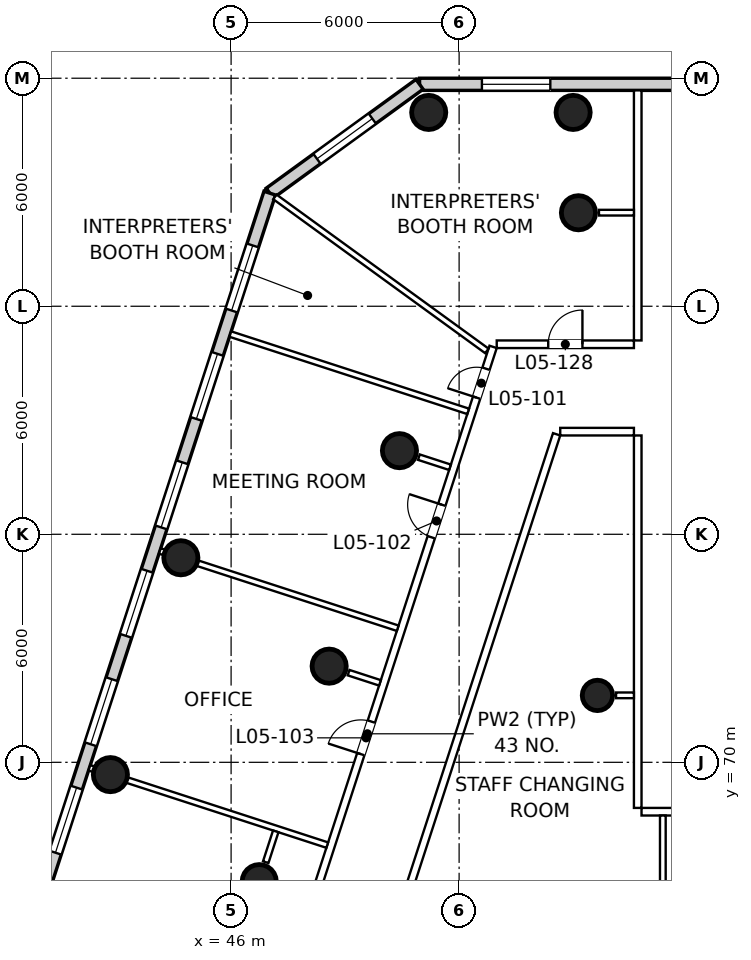
"""IFC4 building model, lengths in metres.
Left out: names, types, materials, properties, quantities, classifications, styles, units other than length and angle.
Written with IfcOpenShell. Run it as: python <this file> out.ifc"""

import sys

from ifc_helpers import new_model, si_unit, direction, frame, frame_2d, origin, origin_2d, place, context, subcontext, project, spatial, rectangle, circle, extrude, element, fill, save


model = new_model("IFC4")
c1 = context("Model", 3, precision=1e-05, world=origin(), true_north=direction((0.0, 1.0)))
c2 = subcontext(c1, "Body", "Model", "MODEL_VIEW")
j1 = project(units=[si_unit("LENGTHUNIT", "METRE"), si_unit("PLANEANGLEUNIT", "RADIAN")], contexts=[c1])
p1 = place(None, origin())
s1 = spatial("IfcSite", under=j1, at=p1, CompositionType="ELEMENT")
p2 = place(p1, origin())
s2 = spatial("IfcBuilding", under=s1, at=p2, CompositionType="ELEMENT")
p3 = place(p2, frame((0.0, 0.0, 34.0)))
s3 = spatial("IfcBuildingStorey", under=s2, at=p3, CompositionType="ELEMENT", Elevation=34.0)
for number, where, z_axis, x_axis in (
    (1, (55.14, 84.46, 0.0), (0.0, 0.0, 1.0), (1.0, 0.0, 0.0)),
    (2, (50.43, 78.2, 0.0), (0.0, 0.0, 1.0), (1.0, 0.0, 0.0)),
    (3, (48.58, 72.53, 0.0), (0.0, 0.0, 1.0), (1.0, 0.0, 0.0)),
    (4, (46.74, 66.86, 0.0), (0.0, 0.0, 1.0), (1.0, 0.0, 0.0)),
):
    element("IfcColumn", number, at=place(p3, frame(where, z_axis=z_axis, x_axis=x_axis)), inside=s3, PredefinedType="COLUMN", context=c2, shape_type="SweptSolid", body=[
        extrude(circle(Radius=0.45, at=origin_2d()), origin(), (0.0, 0.0, 1.0), 5.0),
    ])
p4 = place(p3, frame((55.64, 71.76, 0.0), z_axis=(0.0, 0.0, 1.0), x_axis=(1.0, 0.0, 0.0)))
e5 = element("IfcColumn", 5, at=p4, inside=s3, PredefinedType="COLUMN", context=c2, shape_type="SweptSolid", body=[
    extrude(circle(Radius=0.4, at=origin_2d()), origin(), (0.0, 0.0, 1.0), 5.0),
])
for number, where, z_axis, x_axis in (
    (6, (55.0, 87.1, 0.0), (0.0, 0.0, 1.0), (1.0, 0.0, 0.0)),
    (7, (51.2, 87.1, 0.0), (0.0, 0.0, 1.0), (1.0, 0.0, 0.0)),
    (8, (44.678, 75.382, 0.0), (0.0, 0.0, 1.0), (1.0, 0.0, 0.0)),
    (9, (42.824, 69.676, 0.0), (0.0, 0.0, 1.0), (1.0, 0.0, 0.0)),
):
    element("IfcColumn", number, at=place(p3, frame(where, z_axis=z_axis, x_axis=x_axis)), inside=s3, PredefinedType="COLUMN", context=c2, shape_type="SweptSolid", body=[
        extrude(circle(Radius=0.45, at=origin_2d()), origin(), (0.0, 0.0, 1.0), 5.0),
    ])
p5 = place(p3, frame((59.0, 87.84, 0.0), z_axis=(0.0, 0.0, 1.0), x_axis=(-1.0, 0.0, 0.0)))
e10 = element("IfcWall", 10, at=p5, inside=s3, PredefinedType="SOLIDWALL", context=c2, shape_type="SweptSolid", body=[
    extrude(rectangle(XDim=8.041, YDim=0.32, at=frame_2d((4.021, 0.0))), origin(), (0.0, 0.0, 1.0), 4.6),
])
p6 = place(p5, frame((4.6, 0.0, 0.9)))
e11 = element("IfcOpeningElement", 11, at=p6, cuts=e10, PredefinedType="OPENING", context=c2, shape_type="SweptSolid", body=[
    extrude(rectangle(XDim=1.8, YDim=2.1, at=frame_2d((0.9, 1.05))), frame((0.0, 0.17, 0.0), z_axis=(0.0, -1.0, 0.0), x_axis=(1.0, 0.0, 0.0)), (0.0, 0.0, 1.0), 0.34),
])
p7 = place(p3, frame((50.959, 87.84, 0.0), z_axis=(0.0, 0.0, 1.0), x_axis=(-0.809004657531, -0.587802232127, 0.0)))
e12 = element("IfcWall", 12, at=p7, inside=s3, PredefinedType="SOLIDWALL", context=c2, shape_type="SweptSolid", body=[
    extrude(rectangle(XDim=4.873, YDim=0.32, at=frame_2d((2.437, 0.0))), origin(), (0.0, 0.0, 1.0), 4.6),
])
p8 = place(p7, frame((1.536, 0.0, 0.9)))
e13 = element("IfcOpeningElement", 13, at=p8, cuts=e12, PredefinedType="OPENING", context=c2, shape_type="SweptSolid", body=[
    extrude(rectangle(XDim=1.8, YDim=2.1, at=frame_2d((0.9, 1.05))), frame((0.0, 0.17, 0.0), z_axis=(0.0, -1.0, 0.0), x_axis=(1.0, 0.0, 0.0)), (0.0, 0.0, 1.0), 0.34),
])
p9 = place(p3, frame((47.017, 84.976, 0.0), z_axis=(0.0, 0.0, 1.0), x_axis=(-0.309015385889, -0.951057038922, 0.0)))
e14 = element("IfcWall", 14, at=p9, inside=s3, PredefinedType="SOLIDWALL", context=c2, shape_type="SweptSolid", body=[
    extrude(rectangle(XDim=25.694, YDim=0.32, at=frame_2d((12.847, 0.0))), origin(), (0.0, 0.0, 1.0), 4.6),
])
p10 = place(p9, frame((1.447, 0.0, 0.9)))
e15 = element("IfcOpeningElement", 15, at=p10, cuts=e14, PredefinedType="OPENING", context=c2, shape_type="SweptSolid", body=[
    extrude(rectangle(XDim=1.8, YDim=2.1, at=frame_2d((0.9, 1.05))), frame((0.0, 0.17, 0.0), z_axis=(0.0, -1.0, 0.0), x_axis=(1.0, 0.0, 0.0)), (0.0, 0.0, 1.0), 0.34),
])
p11 = place(p9, frame((4.447, 0.0, 0.9)))
e16 = element("IfcOpeningElement", 16, at=p11, cuts=e14, PredefinedType="OPENING", context=c2, shape_type="SweptSolid", body=[
    extrude(rectangle(XDim=1.8, YDim=2.1, at=frame_2d((0.9, 1.05))), frame((0.0, 0.17, 0.0), z_axis=(0.0, -1.0, 0.0), x_axis=(1.0, 0.0, 0.0)), (0.0, 0.0, 1.0), 0.34),
])
p12 = place(p9, frame((7.447, 0.0, 0.9)))
e17 = element("IfcOpeningElement", 17, at=p12, cuts=e14, PredefinedType="OPENING", context=c2, shape_type="SweptSolid", body=[
    extrude(rectangle(XDim=1.8, YDim=2.1, at=frame_2d((0.9, 1.05))), frame((0.0, 0.17, 0.0), z_axis=(0.0, -1.0, 0.0), x_axis=(1.0, 0.0, 0.0)), (0.0, 0.0, 1.0), 0.34),
])
p13 = place(p9, frame((10.447, 0.0, 0.9)))
e18 = element("IfcOpeningElement", 18, at=p13, cuts=e14, PredefinedType="OPENING", context=c2, shape_type="SweptSolid", body=[
    extrude(rectangle(XDim=1.8, YDim=2.1, at=frame_2d((0.9, 1.05))), frame((0.0, 0.17, 0.0), z_axis=(0.0, -1.0, 0.0), x_axis=(1.0, 0.0, 0.0)), (0.0, 0.0, 1.0), 0.34),
])
p14 = place(p9, frame((13.447, 0.0, 0.9)))
e19 = element("IfcOpeningElement", 19, at=p14, cuts=e14, PredefinedType="OPENING", context=c2, shape_type="SweptSolid", body=[
    extrude(rectangle(XDim=1.8, YDim=2.1, at=frame_2d((0.9, 1.05))), frame((0.0, 0.17, 0.0), z_axis=(0.0, -1.0, 0.0), x_axis=(1.0, 0.0, 0.0)), (0.0, 0.0, 1.0), 0.34),
])
p15 = place(p9, frame((16.447, 0.0, 0.9)))
e20 = element("IfcOpeningElement", 20, at=p15, cuts=e14, PredefinedType="OPENING", context=c2, shape_type="SweptSolid", body=[
    extrude(rectangle(XDim=1.8, YDim=2.1, at=frame_2d((0.9, 1.05))), frame((0.0, 0.17, 0.0), z_axis=(0.0, -1.0, 0.0), x_axis=(1.0, 0.0, 0.0)), (0.0, 0.0, 1.0), 0.34),
])
p16 = place(p9, frame((19.447, 0.0, 0.9)))
e21 = element("IfcOpeningElement", 21, at=p16, cuts=e14, PredefinedType="OPENING", context=c2, shape_type="SweptSolid", body=[
    extrude(rectangle(XDim=1.8, YDim=2.1, at=frame_2d((0.9, 1.05))), frame((0.0, 0.17, 0.0), z_axis=(0.0, -1.0, 0.0), x_axis=(1.0, 0.0, 0.0)), (0.0, 0.0, 1.0), 0.34),
])
p17 = place(p9, frame((22.447, 0.0, 0.9)))
e22 = element("IfcOpeningElement", 22, at=p17, cuts=e14, PredefinedType="OPENING", context=c2, shape_type="SweptSolid", body=[
    extrude(rectangle(XDim=1.8, YDim=2.1, at=frame_2d((0.9, 1.05))), frame((0.0, 0.17, 0.0), z_axis=(0.0, -1.0, 0.0), x_axis=(1.0, 0.0, 0.0)), (0.0, 0.0, 1.0), 0.34),
])
p18 = place(p3, frame((46.279, 60.57, 0.0), z_axis=(0.0, 0.0, 1.0), x_axis=(0.309020575415, 0.951055352737, 0.0)))
e23 = element("IfcWall", 23, at=p18, inside=s3, PredefinedType="PARTITIONING", context=c2, shape_type="SweptSolid", body=[
    extrude(rectangle(XDim=21.409, YDim=0.2, at=frame_2d((10.704, 0.0))), origin(), (0.0, 0.0, 1.0), 3.9),
])
p19 = place(p18, frame((20.005, 0.0, 0.0)))
e24 = element("IfcOpeningElement", 24, at=p19, cuts=e23, PredefinedType="OPENING", context=c2, shape_type="SweptSolid", body=[
    extrude(rectangle(XDim=0.8, YDim=2.1, at=frame_2d((0.4, 1.05))), frame((0.0, 0.11, 0.0), z_axis=(0.0, -1.0, 0.0), x_axis=(1.0, 0.0, 0.0)), (0.0, 0.0, 1.0), 0.22),
])
p20 = place(p18, frame((16.142, 0.0, 0.0)))
e25 = element("IfcOpeningElement", 25, at=p20, cuts=e23, PredefinedType="OPENING", context=c2, shape_type="SweptSolid", body=[
    extrude(rectangle(XDim=0.9, YDim=2.1, at=frame_2d((0.45, 1.05))), frame((0.0, 0.11, 0.0), z_axis=(0.0, -1.0, 0.0), x_axis=(1.0, 0.0, 0.0)), (0.0, 0.0, 1.0), 0.22),
])
p21 = place(p18, frame((10.142, 0.0, 0.0)))
e26 = element("IfcOpeningElement", 26, at=p21, cuts=e23, PredefinedType="OPENING", context=c2, shape_type="SweptSolid", body=[
    extrude(rectangle(XDim=0.9, YDim=2.1, at=frame_2d((0.45, 1.05))), frame((0.0, 0.11, 0.0), z_axis=(0.0, -1.0, 0.0), x_axis=(1.0, 0.0, 0.0)), (0.0, 0.0, 1.0), 0.22),
])
p22 = place(p18, frame((3.33, 0.0, 0.0)))
e27 = element("IfcOpeningElement", 27, at=p22, cuts=e23, PredefinedType="OPENING", context=c2, shape_type="SweptSolid", body=[
    extrude(rectangle(XDim=0.9, YDim=2.1, at=frame_2d((0.45, 1.05))), frame((0.0, 0.11, 0.0), z_axis=(0.0, -1.0, 0.0), x_axis=(1.0, 0.0, 0.0)), (0.0, 0.0, 1.0), 0.22),
])
p23 = place(p3, frame((52.99, 81.0, 0.0), z_axis=(0.0, 0.0, 1.0), x_axis=(1.0, 0.0, 0.0)))
e28 = element("IfcWall", 28, at=p23, inside=s3, PredefinedType="PARTITIONING", context=c2, shape_type="SweptSolid", body=[
    extrude(rectangle(XDim=3.61, YDim=0.2, at=frame_2d((1.805, 0.0))), origin(), (0.0, 0.0, 1.0), 4.6),
])
p24 = place(p23, frame((1.355, 0.0, 0.0)))
e29 = element("IfcOpeningElement", 29, at=p24, cuts=e28, PredefinedType="OPENING", context=c2, shape_type="SweptSolid", body=[
    extrude(rectangle(XDim=0.9, YDim=2.1, at=frame_2d((0.45, 1.05))), frame((0.0, 0.11, 0.0), z_axis=(0.0, -1.0, 0.0), x_axis=(1.0, 0.0, 0.0)), (0.0, 0.0, 1.0), 0.22),
])
p25 = place(p3, frame((56.7, 81.1, 0.0), z_axis=(0.0, 0.0, 1.0), x_axis=(0.0, 1.0, 0.0)))
e30 = element("IfcWall", 30, at=p25, inside=s3, PredefinedType="PARTITIONING", context=c2, shape_type="SweptSolid", body=[
    extrude(rectangle(XDim=6.58, YDim=0.2, at=frame_2d((3.29, 0.0))), origin(), (0.0, 0.0, 1.0), 3.9),
])
p26 = place(p3, frame((68.75, 68.7, 0.0), z_axis=(0.0, 0.0, 1.0), x_axis=(-1.0, 0.0, 0.0)))
e31 = element("IfcWall", 31, at=p26, inside=s3, PredefinedType="PARTITIONING", context=c2, shape_type="SweptSolid", body=[
    extrude(rectangle(XDim=11.95, YDim=0.2, at=frame_2d((5.975, 0.0))), origin(), (0.0, 0.0, 1.0), 4.6),
])
p27 = place(p26, frame((5.195, 0.0, 0.0)))
e32 = element("IfcOpeningElement", 32, at=p27, cuts=e31, PredefinedType="OPENING", context=c2, shape_type="SweptSolid", body=[
    extrude(rectangle(XDim=0.9, YDim=2.1, at=frame_2d((0.45, 1.05))), frame((0.0, 0.11, 0.0), z_axis=(0.0, -1.0, 0.0), x_axis=(1.0, 0.0, 0.0)), (0.0, 0.0, 1.0), 0.22),
])
p28 = place(p3, frame((56.7, 68.8, 0.0), z_axis=(0.0, 0.0, 1.0), x_axis=(0.0, 1.0, 0.0)))
e33 = element("IfcWall", 33, at=p28, inside=s3, PredefinedType="PARTITIONING", context=c2, shape_type="SweptSolid", body=[
    extrude(rectangle(XDim=9.8, YDim=0.2, at=frame_2d((4.9, 0.0))), origin(), (0.0, 0.0, 1.0), 4.0),
])
p29 = place(p3, frame((56.6, 78.7, 0.0), z_axis=(0.0, 0.0, 1.0), x_axis=(-1.0, 0.0, 0.0)))
e34 = element("IfcWall", 34, at=p29, inside=s3, PredefinedType="PARTITIONING", context=c2, shape_type="SweptSolid", body=[
    extrude(rectangle(XDim=1.939, YDim=0.2, at=frame_2d((0.97, 0.0))), origin(), (0.0, 0.0, 1.0), 4.6),
])
p30 = place(p3, frame((54.566, 78.631, 0.0), z_axis=(0.0, 0.0, 1.0), x_axis=(-0.309021827521, -0.951054945897, 0.0)))
e35 = element("IfcWall", 35, at=p30, inside=s3, PredefinedType="PARTITIONING", context=c2, shape_type="SweptSolid", body=[
    extrude(rectangle(XDim=18.99, YDim=0.2, at=frame_2d((9.495, 0.0))), origin(), (0.0, 0.0, 1.0), 4.6),
])
p31 = place(p3, frame((47.153, 84.877, 0.0), z_axis=(0.0, 0.0, 1.0), x_axis=(0.809014705012, -0.587788403317, 0.0)))
e36 = element("IfcWall", 36, at=p31, inside=s3, PredefinedType="PARTITIONING", context=c2, shape_type="SweptSolid", body=[
    extrude(rectangle(XDim=6.894, YDim=0.15, at=frame_2d((3.447, 0.0))), origin(), (0.0, 0.0, 1.0), 4.1),
])
p32 = place(p3, frame((45.98, 81.268, 0.0), z_axis=(0.0, 0.0, 1.0), x_axis=(0.951060241863, -0.309005528021, 0.0)))
e37 = element("IfcWall", 37, at=p32, inside=s3, PredefinedType="PARTITIONING", context=c2, shape_type="SweptSolid", body=[
    extrude(rectangle(XDim=6.58, YDim=0.15, at=frame_2d((3.29, 0.0))), origin(), (0.0, 0.0, 1.0), 4.1),
])
p33 = place(p3, frame((44.126, 75.561, 0.0), z_axis=(0.0, 0.0, 1.0), x_axis=(0.95105288048, -0.309028184041, 0.0)))
e38 = element("IfcWall", 38, at=p33, inside=s3, PredefinedType="PARTITIONING", context=c2, shape_type="SweptSolid", body=[
    extrude(rectangle(XDim=6.58, YDim=0.15, at=frame_2d((3.29, 0.0))), origin(), (0.0, 0.0, 1.0), 4.1),
])
p34 = place(p3, frame((42.272, 69.855, 0.0), z_axis=(0.0, 0.0, 1.0), x_axis=(0.951049337045, -0.309039088961, 0.0)))
e39 = element("IfcWall", 39, at=p34, inside=s3, PredefinedType="PARTITIONING", context=c2, shape_type="SweptSolid", body=[
    extrude(rectangle(XDim=6.58, YDim=0.15, at=frame_2d((3.29, 0.0))), origin(), (0.0, 0.0, 1.0), 4.1),
])
p35 = place(p3, frame((57.361, 64.25, 0.0), z_axis=(0.0, 0.0, 1.0), x_axis=(0.0, 1.0, 0.0)))
e40 = element("IfcWall", 40, at=p35, inside=s3, PredefinedType="PARTITIONING", context=c2, shape_type="SweptSolid", body=[
    extrude(rectangle(XDim=4.35, YDim=0.15, at=frame_2d((2.175, 0.0))), origin(), (0.0, 0.0, 1.0), 4.6),
])
p36 = place(p3, frame((55.68, 84.462, 0.0), z_axis=(0.0, 0.0, 1.0), x_axis=(1.0, 0.0, 0.0)))
e41 = element("IfcWall", 41, at=p36, inside=s3, PredefinedType="PARTITIONING", context=c2, shape_type="SweptSolid", body=[
    extrude(rectangle(XDim=0.92, YDim=0.15, at=frame_2d((0.46, 0.0))), origin(), (0.0, 0.0, 1.0), 4.1),
])
p37 = place(p3, frame((50.942, 78.029, 0.0), z_axis=(0.0, 0.0, 1.0), x_axis=(0.951040325466, -0.309066820183, 0.0)))
e42 = element("IfcWall", 42, at=p37, inside=s3, PredefinedType="PARTITIONING", context=c2, shape_type="SweptSolid", body=[
    extrude(rectangle(XDim=0.86, YDim=0.15, at=frame_2d((0.43, 0.0))), origin(), (0.0, 0.0, 1.0), 4.6),
])
p38 = place(p3, frame((49.092, 72.359, 0.0), z_axis=(0.0, 0.0, 1.0), x_axis=(0.951075416717, -0.308958818803, 0.0)))
e43 = element("IfcWall", 43, at=p38, inside=s3, PredefinedType="PARTITIONING", context=c2, shape_type="SweptSolid", body=[
    extrude(rectangle(XDim=0.868, YDim=0.15, at=frame_2d((0.434, 0.0))), origin(), (0.0, 0.0, 1.0), 4.6),
])
p39 = place(p3, frame((46.911, 67.372, 0.0), z_axis=(0.0, 0.0, 1.0), x_axis=(0.309176694926, 0.951004611616, 0.0)))
e44 = element("IfcWall", 44, at=p39, inside=s3, PredefinedType="PARTITIONING", context=c2, shape_type="SweptSolid", body=[
    extrude(rectangle(XDim=0.853, YDim=0.15, at=frame_2d((0.426, 0.0))), origin(), (0.0, 0.0, 1.0), 4.1),
])
p40 = place(p3, frame((56.13, 71.762, 0.0), z_axis=(0.0, 0.0, 1.0), x_axis=(1.0, 0.0, 0.0)))
e45 = element("IfcWall", 45, at=p40, inside=s3, PredefinedType="PARTITIONING", context=c2, shape_type="SweptSolid", body=[
    extrude(rectangle(XDim=0.47, YDim=0.15, at=frame_2d((0.235, 0.0))), origin(), (0.0, 0.0, 1.0), 4.0),
])
p41 = place(p6, origin())
e46 = element("IfcWindow", 46, at=p41, inside=s3, PartitioningType="SINGLE_PANEL", PredefinedType="WINDOW", context=c2, shape_type="SweptSolid", body=[
    extrude(rectangle(XDim=1.8, YDim=2.1, at=frame_2d((0.9, 1.05))), frame((0.0, 0.07, 0.0), z_axis=(0.0, -1.0, 0.0), x_axis=(1.0, 0.0, 0.0)), (0.0, 0.0, 1.0), 0.06),
])
fill(e11, e46)
p42 = place(p8, origin())
e47 = element("IfcWindow", 47, at=p42, inside=s3, PartitioningType="SINGLE_PANEL", PredefinedType="WINDOW", context=c2, shape_type="SweptSolid", body=[
    extrude(rectangle(XDim=1.8, YDim=2.1, at=frame_2d((0.9, 1.05))), frame((0.0, 0.07, 0.0), z_axis=(0.0, -1.0, 0.0), x_axis=(1.0, 0.0, 0.0)), (0.0, 0.0, 1.0), 0.06),
])
fill(e13, e47)
p43 = place(p10, origin())
e48 = element("IfcWindow", 48, at=p43, inside=s3, PartitioningType="SINGLE_PANEL", PredefinedType="WINDOW", context=c2, shape_type="SweptSolid", body=[
    extrude(rectangle(XDim=1.8, YDim=2.1, at=frame_2d((0.9, 1.05))), frame((0.0, 0.07, 0.0), z_axis=(0.0, -1.0, 0.0), x_axis=(1.0, 0.0, 0.0)), (0.0, 0.0, 1.0), 0.06),
])
fill(e15, e48)
p44 = place(p11, origin())
e49 = element("IfcWindow", 49, at=p44, inside=s3, PartitioningType="SINGLE_PANEL", PredefinedType="WINDOW", context=c2, shape_type="SweptSolid", body=[
    extrude(rectangle(XDim=1.8, YDim=2.1, at=frame_2d((0.9, 1.05))), frame((0.0, 0.07, 0.0), z_axis=(0.0, -1.0, 0.0), x_axis=(1.0, 0.0, 0.0)), (0.0, 0.0, 1.0), 0.06),
])
fill(e16, e49)
p45 = place(p12, origin())
e50 = element("IfcWindow", 50, at=p45, inside=s3, PartitioningType="SINGLE_PANEL", PredefinedType="WINDOW", context=c2, shape_type="SweptSolid", body=[
    extrude(rectangle(XDim=1.8, YDim=2.1, at=frame_2d((0.9, 1.05))), frame((0.0, 0.07, 0.0), z_axis=(0.0, -1.0, 0.0), x_axis=(1.0, 0.0, 0.0)), (0.0, 0.0, 1.0), 0.06),
])
fill(e17, e50)
p46 = place(p13, origin())
e51 = element("IfcWindow", 51, at=p46, inside=s3, PartitioningType="SINGLE_PANEL", PredefinedType="WINDOW", context=c2, shape_type="SweptSolid", body=[
    extrude(rectangle(XDim=1.8, YDim=2.1, at=frame_2d((0.9, 1.05))), frame((0.0, 0.07, 0.0), z_axis=(0.0, -1.0, 0.0), x_axis=(1.0, 0.0, 0.0)), (0.0, 0.0, 1.0), 0.06),
])
fill(e18, e51)
p47 = place(p14, origin())
e52 = element("IfcWindow", 52, at=p47, inside=s3, PartitioningType="SINGLE_PANEL", PredefinedType="WINDOW", context=c2, shape_type="SweptSolid", body=[
    extrude(rectangle(XDim=1.8, YDim=2.1, at=frame_2d((0.9, 1.05))), frame((0.0, 0.07, 0.0), z_axis=(0.0, -1.0, 0.0), x_axis=(1.0, 0.0, 0.0)), (0.0, 0.0, 1.0), 0.06),
])
fill(e19, e52)
p48 = place(p15, origin())
e53 = element("IfcWindow", 53, at=p48, inside=s3, PartitioningType="SINGLE_PANEL", PredefinedType="WINDOW", context=c2, shape_type="SweptSolid", body=[
    extrude(rectangle(XDim=1.8, YDim=2.1, at=frame_2d((0.9, 1.05))), frame((0.0, 0.07, 0.0), z_axis=(0.0, -1.0, 0.0), x_axis=(1.0, 0.0, 0.0)), (0.0, 0.0, 1.0), 0.06),
])
fill(e20, e53)
p49 = place(p19, origin())
e54 = element("IfcDoor", 54, at=p49, inside=s3, OperationType="SINGLE_SWING_LEFT", PredefinedType="DOOR", context=c2, shape_type="SweptSolid", body=[
    extrude(rectangle(XDim=0.8, YDim=2.1, at=frame_2d((0.4, 1.05))), frame((0.0, 0.025, 0.0), z_axis=(0.0, -1.0, 0.0), x_axis=(1.0, 0.0, 0.0)), (0.0, 0.0, 1.0), 0.05),
])
fill(e24, e54)
p50 = place(p20, origin())
e55 = element("IfcDoor", 55, at=p50, inside=s3, OperationType="SINGLE_SWING_RIGHT", PredefinedType="DOOR", context=c2, shape_type="SweptSolid", body=[
    extrude(rectangle(XDim=0.9, YDim=2.1, at=frame_2d((0.45, 1.05))), frame((0.0, 0.025, 0.0), z_axis=(0.0, -1.0, 0.0), x_axis=(1.0, 0.0, 0.0)), (0.0, 0.0, 1.0), 0.05),
])
fill(e25, e55)
p51 = place(p21, origin())
e56 = element("IfcDoor", 56, at=p51, inside=s3, OperationType="SINGLE_SWING_LEFT", PredefinedType="DOOR", context=c2, shape_type="SweptSolid", body=[
    extrude(rectangle(XDim=0.9, YDim=2.1, at=frame_2d((0.45, 1.05))), frame((0.0, 0.025, 0.0), z_axis=(0.0, -1.0, 0.0), x_axis=(1.0, 0.0, 0.0)), (0.0, 0.0, 1.0), 0.05),
])
fill(e26, e56)
p52 = place(p24, origin())
e57 = element("IfcDoor", 57, at=p52, inside=s3, OperationType="SINGLE_SWING_RIGHT", PredefinedType="DOOR", context=c2, shape_type="SweptSolid", body=[
    extrude(rectangle(XDim=0.9, YDim=2.1, at=frame_2d((0.45, 1.05))), frame((0.0, 0.025, 0.0), z_axis=(0.0, -1.0, 0.0), x_axis=(1.0, 0.0, 0.0)), (0.0, 0.0, 1.0), 0.05),
])
fill(e29, e57)
save(model, sys.argv[1])
